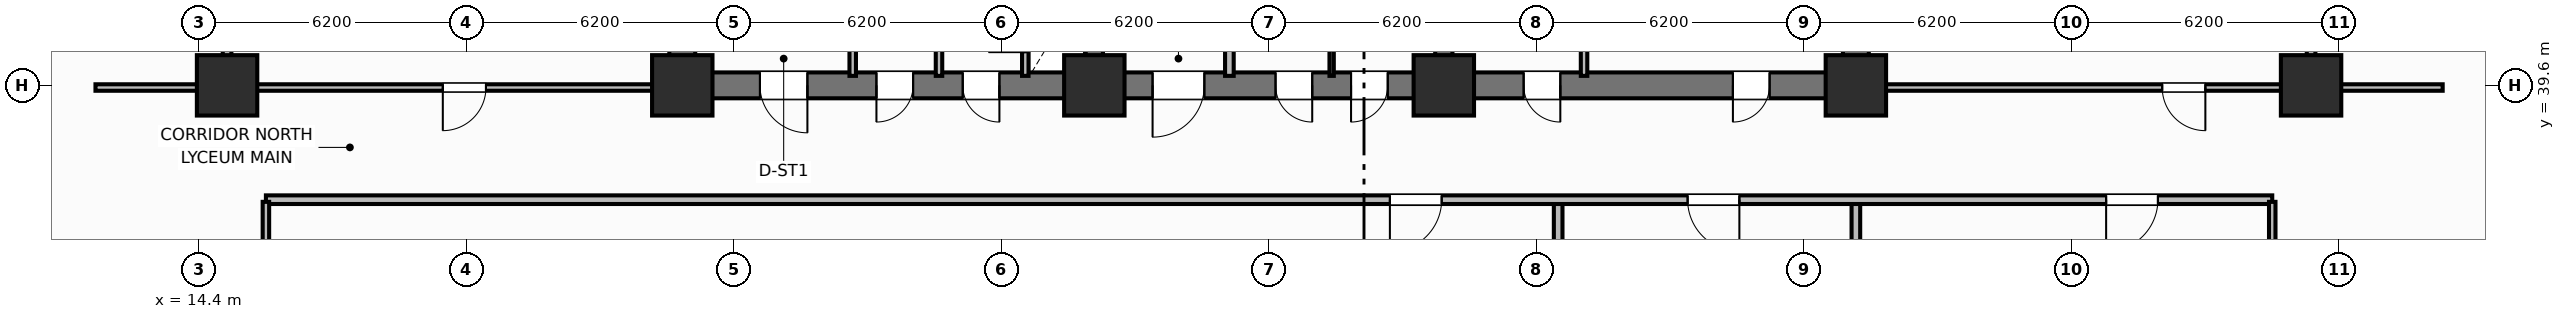
"""IFC4 building model, lengths in metres.
Left out: names, types, materials, properties, quantities, classifications, styles, units other than length and angle.
Written with IfcOpenShell. Run it as: python <this file> out.ifc"""

import sys

from ifc_helpers import new_model, si_unit, direction, frame, frame_2d, origin, origin_2d, place, context, subcontext, project, spatial, rectangle, extrude, element, fill, save


model = new_model("IFC4")
c1 = context("Model", 3, precision=1e-05, world=origin(), true_north=direction((0.0, 1.0)))
c2 = subcontext(c1, "Body", "Model", "MODEL_VIEW")
j1 = project(units=[si_unit("LENGTHUNIT", "METRE"), si_unit("PLANEANGLEUNIT", "RADIAN")], contexts=[c1])
p1 = place(None, origin())
s1 = spatial("IfcSite", under=j1, at=p1, CompositionType="ELEMENT")
p2 = place(p1, origin())
s2 = spatial("IfcBuilding", under=s1, at=p2, CompositionType="ELEMENT")
p3 = place(p2, frame((0.0, 0.0, 15.6)))
s3 = spatial("IfcBuildingStorey", under=s2, at=p3, CompositionType="ELEMENT", Elevation=15.6)
for number, where, z_axis, x_axis in (
    (1, (25.6, 39.9, 0.0), (0.0, 0.0, 1.0), (0.0, 1.0, 0.0)),
    (2, (52.8, 39.9, 0.0), (0.0, 0.0, 1.0), (0.0, 1.0, 0.0)),
):
    element("IfcWall", number, at=place(p3, frame(where, z_axis=z_axis, x_axis=x_axis)), inside=s3, PredefinedType="SHEAR", context=c2, shape_type="SweptSolid", body=[
        extrude(rectangle(XDim=5.6, YDim=0.6, at=frame_2d((2.8, 0.0))), origin(), (0.0, 0.0, 1.0), 4.5),
    ])
p4 = place(p3, frame((52.8, 39.6, 0.0), z_axis=(0.0, 0.0, 1.0), x_axis=(-1.0, 0.0, 0.0)))
e3 = element("IfcWall", 3, at=p4, inside=s3, PredefinedType="SHEAR", context=c2, shape_type="SweptSolid", body=[
    extrude(rectangle(XDim=27.2, YDim=0.6, at=frame_2d((13.6, 0.0))), origin(), (0.0, 0.0, 1.0), 4.5),
])
p5 = place(p4, frame((24.3, 0.0, 0.0)))
e4 = element("IfcOpeningElement", 4, at=p5, cuts=e3, PredefinedType="OPENING", context=c2, shape_type="SweptSolid", body=[
    extrude(rectangle(XDim=1.1, YDim=2.15, at=frame_2d((0.55, 1.075))), frame((0.0, 0.31, 0.0), z_axis=(0.0, -1.0, 0.0), x_axis=(1.0, 0.0, 0.0)), (0.0, 0.0, 1.0), 0.62),
])
p6 = place(p4, frame((21.85, 0.0, 0.0)))
e5 = element("IfcOpeningElement", 5, at=p6, cuts=e3, PredefinedType="OPENING", context=c2, shape_type="SweptSolid", body=[
    extrude(rectangle(XDim=0.85, YDim=2.1, at=frame_2d((0.425, 1.05))), frame((0.0, 0.31, 0.0), z_axis=(0.0, -1.0, 0.0), x_axis=(1.0, 0.0, 0.0)), (0.0, 0.0, 1.0), 0.62),
])
p7 = place(p4, frame((19.85, 0.0, 0.0)))
e6 = element("IfcOpeningElement", 6, at=p7, cuts=e3, PredefinedType="OPENING", context=c2, shape_type="SweptSolid", body=[
    extrude(rectangle(XDim=0.85, YDim=2.1, at=frame_2d((0.425, 1.05))), frame((0.0, 0.31, 0.0), z_axis=(0.0, -1.0, 0.0), x_axis=(1.0, 0.0, 0.0)), (0.0, 0.0, 1.0), 0.62),
])
p8 = place(p4, frame((15.1, 0.0, 0.0)))
e7 = element("IfcOpeningElement", 7, at=p8, cuts=e3, PredefinedType="OPENING", context=c2, shape_type="SweptSolid", body=[
    extrude(rectangle(XDim=1.2, YDim=2.15, at=frame_2d((0.6, 1.075))), frame((0.0, 0.31, 0.0), z_axis=(0.0, -1.0, 0.0), x_axis=(1.0, 0.0, 0.0)), (0.0, 0.0, 1.0), 0.62),
])
p9 = place(p4, frame((12.6, 0.0, 0.0)))
e8 = element("IfcOpeningElement", 8, at=p9, cuts=e3, PredefinedType="OPENING", context=c2, shape_type="SweptSolid", body=[
    extrude(rectangle(XDim=0.85, YDim=2.1, at=frame_2d((0.425, 1.05))), frame((0.0, 0.31, 0.0), z_axis=(0.0, -1.0, 0.0), x_axis=(1.0, 0.0, 0.0)), (0.0, 0.0, 1.0), 0.62),
])
p10 = place(p4, frame((10.85, 0.0, 0.0)))
e9 = element("IfcOpeningElement", 9, at=p10, cuts=e3, PredefinedType="OPENING", context=c2, shape_type="SweptSolid", body=[
    extrude(rectangle(XDim=0.85, YDim=2.1, at=frame_2d((0.425, 1.05))), frame((0.0, 0.31, 0.0), z_axis=(0.0, -1.0, 0.0), x_axis=(1.0, 0.0, 0.0)), (0.0, 0.0, 1.0), 0.62),
])
p11 = place(p4, frame((6.85, 0.0, 0.0)))
e10 = element("IfcOpeningElement", 10, at=p11, cuts=e3, PredefinedType="OPENING", context=c2, shape_type="SweptSolid", body=[
    extrude(rectangle(XDim=0.85, YDim=2.1, at=frame_2d((0.425, 1.05))), frame((0.0, 0.31, 0.0), z_axis=(0.0, -1.0, 0.0), x_axis=(1.0, 0.0, 0.0)), (0.0, 0.0, 1.0), 0.62),
])
p12 = place(p4, frame((2.0, 0.0, 0.0)))
e11 = element("IfcOpeningElement", 11, at=p12, cuts=e3, PredefinedType="OPENING", context=c2, shape_type="SweptSolid", body=[
    extrude(rectangle(XDim=0.85, YDim=2.1, at=frame_2d((0.425, 1.05))), frame((0.0, 0.31, 0.0), z_axis=(0.0, -1.0, 0.0), x_axis=(1.0, 0.0, 0.0)), (0.0, 0.0, 1.0), 0.62),
])
for number, where, z_axis, x_axis in (
    (12, (35.15, 39.9, 0.0), (0.0, 0.0, 1.0), (0.0, 1.0, 0.0)),
    (13, (43.25, 39.9, 0.0), (0.0, 0.0, 1.0), (0.0, 1.0, 0.0)),
):
    element("IfcWall", number, at=place(p3, frame(where, z_axis=z_axis, x_axis=x_axis)), inside=s3, PredefinedType="SHEAR", context=c2, shape_type="SweptSolid", body=[
        extrude(rectangle(XDim=5.6, YDim=0.4, at=frame_2d((2.8, 0.0))), origin(), (0.0, 0.0, 1.0), 4.5),
    ])
for number, where, z_axis, x_axis in (
    (14, (25.6, 39.6, 0.0), (0.0, 0.0, 1.0), (1.0, 0.0, 0.0)),
    (15, (35.15, 39.6, 0.0), (0.0, 0.0, 1.0), (1.0, 0.0, 0.0)),
    (16, (43.25, 39.6, 0.0), (0.0, 0.0, 1.0), (1.0, 0.0, 0.0)),
    (17, (52.8, 39.6, 0.0), (0.0, 0.0, 1.0), (1.0, 0.0, 0.0)),
    (18, (15.05, 39.6, 0.0), (0.0, 0.0, 1.0), (1.0, 0.0, 0.0)),
    (19, (63.35, 39.6, 0.0), (0.0, 0.0, 1.0), (1.0, 0.0, 0.0)),
):
    element("IfcColumn", number, at=place(p3, frame(where, z_axis=z_axis, x_axis=x_axis)), inside=s3, PredefinedType="COLUMN", context=c2, shape_type="SweptSolid", body=[
        extrude(rectangle(XDim=1.4, YDim=1.4, at=origin_2d()), origin(), (0.0, 0.0, 1.0), 4.5),
    ])
p13 = place(p3, frame((33.55, 39.82, 0.0), z_axis=(0.0, 0.0, 1.0), x_axis=(0.0, 1.0, 0.0)))
e20 = element("IfcWall", 20, at=p13, inside=s3, PredefinedType="PARTITIONING", context=c2, shape_type="SweptSolid", body=[
    extrude(rectangle(XDim=2.13, YDim=0.15, at=frame_2d((1.065, 0.0))), origin(), (0.0, 0.0, 1.0), 3.42),
])
p14 = place(p13, frame((0.55, 0.0, 0.0)))
e21 = element("IfcOpeningElement", 21, at=p14, cuts=e20, PredefinedType="OPENING", context=c2, shape_type="SweptSolid", body=[
    extrude(rectangle(XDim=0.85, YDim=2.05, at=frame_2d((0.425, 1.025))), frame((0.0, 0.085, 0.0), z_axis=(0.0, -1.0, 0.0), x_axis=(1.0, 0.0, 0.0)), (0.0, 0.0, 1.0), 0.17),
])
for number, where, z_axis, x_axis in (
    (22, (29.55, 39.82, 0.0), (0.0, 0.0, 1.0), (0.0, 1.0, 0.0)),
    (23, (31.55, 39.82, 0.0), (0.0, 0.0, 1.0), (0.0, 1.0, 0.0)),
):
    element("IfcWall", number, at=place(p3, frame(where, z_axis=z_axis, x_axis=x_axis)), inside=s3, PredefinedType="PARTITIONING", context=c2, shape_type="SweptSolid", body=[
        extrude(rectangle(XDim=2.13, YDim=0.15, at=frame_2d((1.065, 0.0))), origin(), (0.0, 0.0, 1.0), 3.42),
    ])
p15 = place(p3, frame((38.28, 39.82, 0.0), z_axis=(0.0, 0.0, 1.0), x_axis=(0.0, 1.0, 0.0)))
e24 = element("IfcWall", 24, at=p15, inside=s3, PredefinedType="PARTITIONING", context=c2, shape_type="SweptSolid", body=[
    extrude(rectangle(XDim=2.73, YDim=0.2, at=frame_2d((1.365, 0.0))), origin(), (0.0, 0.0, 1.0), 3.42),
])
p16 = place(p3, frame((40.65, 39.82, 0.0), z_axis=(0.0, 0.0, 1.0), x_axis=(0.0, 1.0, 0.0)))
e25 = element("IfcWall", 25, at=p16, inside=s3, PredefinedType="PARTITIONING", context=c2, shape_type="SweptSolid", body=[
    extrude(rectangle(XDim=2.73, YDim=0.1, at=frame_2d((1.365, 0.0))), origin(), (0.0, 0.0, 1.0), 3.42),
])
p17 = place(p3, frame((46.5, 39.82, 0.0), z_axis=(0.0, 0.0, 1.0), x_axis=(0.0, 1.0, 0.0)))
e26 = element("IfcWall", 26, at=p17, inside=s3, PredefinedType="PARTITIONING", context=c2, shape_type="SweptSolid", body=[
    extrude(rectangle(XDim=2.73, YDim=0.15, at=frame_2d((1.365, 0.0))), origin(), (0.0, 0.0, 1.0), 3.42),
])
for number, where, z_axis, x_axis in (
    (27, (45.9, 19.5, 0.0), (0.0, 0.0, 1.0), (0.0, 1.0, 0.0)),
    (28, (52.8, 19.5, 0.0), (0.0, 0.0, 1.0), (0.0, 1.0, 0.0)),
):
    element("IfcWall", number, at=place(p3, frame(where, z_axis=z_axis, x_axis=x_axis)), inside=s3, PredefinedType="PARTITIONING", context=c2, shape_type="SweptSolid", body=[
        extrude(rectangle(XDim=17.4, YDim=0.2, at=frame_2d((8.7, 0.0))), origin(), (0.0, 0.0, 1.0), 3.42),
    ])
p18 = place(p3, frame((62.45, 36.95, 0.0), z_axis=(0.0, 0.0, 1.0), x_axis=(-1.0, 0.0, 0.0)))
e29 = element("IfcWall", 29, at=p18, inside=s3, PredefinedType="PARTITIONING", context=c2, shape_type="SweptSolid", body=[
    extrude(rectangle(XDim=46.5, YDim=0.2, at=frame_2d((23.25, 0.0))), origin(), (0.0, 0.0, 1.0), 3.42),
])
p19 = place(p18, frame((19.25, 0.0, 0.0)))
e30 = element("IfcOpeningElement", 30, at=p19, cuts=e29, PredefinedType="OPENING", context=c2, shape_type="SweptSolid", body=[
    extrude(rectangle(XDim=1.2, YDim=2.15, at=frame_2d((0.6, 1.075))), frame((0.0, 0.11, 0.0), z_axis=(0.0, -1.0, 0.0), x_axis=(1.0, 0.0, 0.0)), (0.0, 0.0, 1.0), 0.22),
])
p20 = place(p18, frame((12.35, 0.0, 0.0)))
e31 = element("IfcOpeningElement", 31, at=p20, cuts=e29, PredefinedType="OPENING", context=c2, shape_type="SweptSolid", body=[
    extrude(rectangle(XDim=1.2, YDim=2.15, at=frame_2d((0.6, 1.075))), frame((0.0, 0.11, 0.0), z_axis=(0.0, -1.0, 0.0), x_axis=(1.0, 0.0, 0.0)), (0.0, 0.0, 1.0), 0.22),
])
p21 = place(p18, frame((2.65, 0.0, 0.0)))
e32 = element("IfcOpeningElement", 32, at=p21, cuts=e29, PredefinedType="OPENING", context=c2, shape_type="SweptSolid", body=[
    extrude(rectangle(XDim=1.2, YDim=2.15, at=frame_2d((0.6, 1.075))), frame((0.0, 0.11, 0.0), z_axis=(0.0, -1.0, 0.0), x_axis=(1.0, 0.0, 0.0)), (0.0, 0.0, 1.0), 0.22),
])
for number, where, z_axis, x_axis in (
    (33, (15.95, 19.5, 0.0), (0.0, 0.0, 1.0), (0.0, 1.0, 0.0)),
    (34, (62.45, 19.5, 0.0), (0.0, 0.0, 1.0), (0.0, 1.0, 0.0)),
):
    element("IfcWall", number, at=place(p3, frame(where, z_axis=z_axis, x_axis=x_axis)), inside=s3, PredefinedType="PARTITIONING", context=c2, shape_type="SweptSolid", body=[
        extrude(rectangle(XDim=17.4, YDim=0.15, at=frame_2d((8.7, 0.0))), origin(), (0.0, 0.0, 1.0), 3.42),
    ])
p22 = place(p3, frame((15.05, 39.6, 0.0), z_axis=(0.0, 0.0, 1.0), x_axis=(0.0, 1.0, 0.0)))
e35 = element("IfcWall", 35, at=p22, inside=s3, PredefinedType="PARTITIONING", context=c2, shape_type="SweptSolid", body=[
    extrude(rectangle(XDim=16.4, YDim=0.2, at=frame_2d((8.2, 0.0))), origin(), (0.0, 0.0, 1.0), 3.42),
])
p23 = place(p22, frame((3.4, 0.0, 0.0)))
e36 = element("IfcOpeningElement", 36, at=p23, cuts=e35, PredefinedType="OPENING", context=c2, shape_type="SweptSolid", body=[
    extrude(rectangle(XDim=1.0, YDim=2.15, at=frame_2d((0.5, 1.075))), frame((0.0, 0.11, 0.0), z_axis=(0.0, -1.0, 0.0), x_axis=(1.0, 0.0, 0.0)), (0.0, 0.0, 1.0), 0.22),
])
p24 = place(p3, frame((25.25, 39.55, 0.0), z_axis=(0.0, 0.0, 1.0), x_axis=(-1.0, 0.0, 0.0)))
e37 = element("IfcWall", 37, at=p24, inside=s3, PredefinedType="PARTITIONING", context=c2, shape_type="SweptSolid", body=[
    extrude(rectangle(XDim=13.25, YDim=0.15, at=frame_2d((6.625, 0.0))), origin(), (0.0, 0.0, 1.0), 3.42),
])
p25 = place(p24, frame((4.2, 0.0, 0.0)))
e38 = element("IfcOpeningElement", 38, at=p25, cuts=e37, PredefinedType="OPENING", context=c2, shape_type="SweptSolid", body=[
    extrude(rectangle(XDim=1.0, YDim=2.15, at=frame_2d((0.5, 1.075))), frame((0.0, 0.085, 0.0), z_axis=(0.0, -1.0, 0.0), x_axis=(1.0, 0.0, 0.0)), (0.0, 0.0, 1.0), 0.17),
])
p26 = place(p3, frame((63.35, 39.6, 0.0), z_axis=(0.0, 0.0, 1.0), x_axis=(0.0, 1.0, 0.0)))
e39 = element("IfcWall", 39, at=p26, inside=s3, PredefinedType="PARTITIONING", context=c2, shape_type="SweptSolid", body=[
    extrude(rectangle(XDim=16.4, YDim=0.2, at=frame_2d((8.2, 0.0))), origin(), (0.0, 0.0, 1.0), 3.42),
])
p27 = place(p26, frame((3.4, 0.0, 0.0)))
e40 = element("IfcOpeningElement", 40, at=p27, cuts=e39, PredefinedType="OPENING", context=c2, shape_type="SweptSolid", body=[
    extrude(rectangle(XDim=1.0, YDim=2.15, at=frame_2d((0.5, 1.075))), frame((0.0, 0.11, 0.0), z_axis=(0.0, -1.0, 0.0), x_axis=(1.0, 0.0, 0.0)), (0.0, 0.0, 1.0), 0.22),
])
p28 = place(p3, frame((66.4, 39.55, 0.0), z_axis=(0.0, 0.0, 1.0), x_axis=(-1.0, 0.0, 0.0)))
e41 = element("IfcWall", 41, at=p28, inside=s3, PredefinedType="PARTITIONING", context=c2, shape_type="SweptSolid", body=[
    extrude(rectangle(XDim=13.25, YDim=0.15, at=frame_2d((6.625, 0.0))), origin(), (0.0, 0.0, 1.0), 3.42),
])
p29 = place(p28, frame((5.5, 0.0, 0.0)))
e42 = element("IfcOpeningElement", 42, at=p29, cuts=e41, PredefinedType="OPENING", context=c2, shape_type="SweptSolid", body=[
    extrude(rectangle(XDim=1.0, YDim=2.15, at=frame_2d((0.5, 1.075))), frame((0.0, 0.085, 0.0), z_axis=(0.0, -1.0, 0.0), x_axis=(1.0, 0.0, 0.0)), (0.0, 0.0, 1.0), 0.17),
])
p30 = place(p14, origin())
e43 = element("IfcDoor", 43, at=p30, inside=s3, OperationType="SINGLE_SWING_LEFT", PredefinedType="TRAPDOOR", context=c2, shape_type="SweptSolid", body=[
    extrude(rectangle(XDim=0.85, YDim=2.05, at=frame_2d((0.425, 1.025))), frame((0.0, 0.025, 0.0), z_axis=(0.0, -1.0, 0.0), x_axis=(1.0, 0.0, 0.0)), (0.0, 0.0, 1.0), 0.05),
])
fill(e21, e43)
p31 = place(p19, origin())
e44 = element("IfcDoor", 44, at=p31, inside=s3, OperationType="SINGLE_SWING_RIGHT", PredefinedType="DOOR", context=c2, shape_type="SweptSolid", body=[
    extrude(rectangle(XDim=1.2, YDim=2.15, at=frame_2d((0.6, 1.075))), frame((0.0, 0.025, 0.0), z_axis=(0.0, -1.0, 0.0), x_axis=(1.0, 0.0, 0.0)), (0.0, 0.0, 1.0), 0.05),
])
fill(e30, e44)
p32 = place(p20, origin())
e45 = element("IfcDoor", 45, at=p32, inside=s3, OperationType="SINGLE_SWING_LEFT", PredefinedType="DOOR", context=c2, shape_type="SweptSolid", body=[
    extrude(rectangle(XDim=1.2, YDim=2.15, at=frame_2d((0.6, 1.075))), frame((0.0, 0.025, 0.0), z_axis=(0.0, -1.0, 0.0), x_axis=(1.0, 0.0, 0.0)), (0.0, 0.0, 1.0), 0.05),
])
fill(e31, e45)
p33 = place(p21, origin())
e46 = element("IfcDoor", 46, at=p33, inside=s3, OperationType="SINGLE_SWING_RIGHT", PredefinedType="DOOR", context=c2, shape_type="SweptSolid", body=[
    extrude(rectangle(XDim=1.2, YDim=2.15, at=frame_2d((0.6, 1.075))), frame((0.0, 0.025, 0.0), z_axis=(0.0, -1.0, 0.0), x_axis=(1.0, 0.0, 0.0)), (0.0, 0.0, 1.0), 0.05),
])
fill(e32, e46)
p34 = place(p25, origin())
e47 = element("IfcDoor", 47, at=p34, inside=s3, OperationType="SINGLE_SWING_RIGHT", PredefinedType="DOOR", context=c2, shape_type="SweptSolid", body=[
    extrude(rectangle(XDim=1.0, YDim=2.15, at=frame_2d((0.5, 1.075))), frame((0.0, 0.025, 0.0), z_axis=(0.0, -1.0, 0.0), x_axis=(1.0, 0.0, 0.0)), (0.0, 0.0, 1.0), 0.05),
])
fill(e38, e47)
p35 = place(p29, origin())
e48 = element("IfcDoor", 48, at=p35, inside=s3, OperationType="SINGLE_SWING_LEFT", PredefinedType="DOOR", context=c2, shape_type="SweptSolid", body=[
    extrude(rectangle(XDim=1.0, YDim=2.15, at=frame_2d((0.5, 1.075))), frame((0.0, 0.025, 0.0), z_axis=(0.0, -1.0, 0.0), x_axis=(1.0, 0.0, 0.0)), (0.0, 0.0, 1.0), 0.05),
])
fill(e42, e48)
p36 = place(p5, origin())
e49 = element("IfcDoor", 49, at=p36, inside=s3, OperationType="SINGLE_SWING_LEFT", PredefinedType="DOOR", context=c2, shape_type="SweptSolid", body=[
    extrude(rectangle(XDim=1.1, YDim=2.15, at=frame_2d((0.55, 1.075))), frame((0.0, 0.025, 0.0), z_axis=(0.0, -1.0, 0.0), x_axis=(1.0, 0.0, 0.0)), (0.0, 0.0, 1.0), 0.05),
])
fill(e4, e49)
p37 = place(p6, origin())
e50 = element("IfcDoor", 50, at=p37, inside=s3, OperationType="SINGLE_SWING_RIGHT", PredefinedType="DOOR", context=c2, shape_type="SweptSolid", body=[
    extrude(rectangle(XDim=0.85, YDim=2.1, at=frame_2d((0.425, 1.05))), frame((0.0, 0.025, 0.0), z_axis=(0.0, -1.0, 0.0), x_axis=(1.0, 0.0, 0.0)), (0.0, 0.0, 1.0), 0.05),
])
fill(e5, e50)
p38 = place(p7, origin())
e51 = element("IfcDoor", 51, at=p38, inside=s3, OperationType="SINGLE_SWING_LEFT", PredefinedType="DOOR", context=c2, shape_type="SweptSolid", body=[
    extrude(rectangle(XDim=0.85, YDim=2.1, at=frame_2d((0.425, 1.05))), frame((0.0, 0.025, 0.0), z_axis=(0.0, -1.0, 0.0), x_axis=(1.0, 0.0, 0.0)), (0.0, 0.0, 1.0), 0.05),
])
fill(e6, e51)
p39 = place(p8, origin())
e52 = element("IfcDoor", 52, at=p39, inside=s3, OperationType="SINGLE_SWING_RIGHT", PredefinedType="DOOR", context=c2, shape_type="SweptSolid", body=[
    extrude(rectangle(XDim=1.2, YDim=2.15, at=frame_2d((0.6, 1.075))), frame((0.0, 0.025, 0.0), z_axis=(0.0, -1.0, 0.0), x_axis=(1.0, 0.0, 0.0)), (0.0, 0.0, 1.0), 0.05),
])
fill(e7, e52)
p40 = place(p9, origin())
e53 = element("IfcDoor", 53, at=p40, inside=s3, OperationType="SINGLE_SWING_LEFT", PredefinedType="DOOR", context=c2, shape_type="SweptSolid", body=[
    extrude(rectangle(XDim=0.85, YDim=2.1, at=frame_2d((0.425, 1.05))), frame((0.0, 0.025, 0.0), z_axis=(0.0, -1.0, 0.0), x_axis=(1.0, 0.0, 0.0)), (0.0, 0.0, 1.0), 0.05),
])
fill(e8, e53)
p41 = place(p10, origin())
e54 = element("IfcDoor", 54, at=p41, inside=s3, OperationType="SINGLE_SWING_RIGHT", PredefinedType="DOOR", context=c2, shape_type="SweptSolid", body=[
    extrude(rectangle(XDim=0.85, YDim=2.1, at=frame_2d((0.425, 1.05))), frame((0.0, 0.025, 0.0), z_axis=(0.0, -1.0, 0.0), x_axis=(1.0, 0.0, 0.0)), (0.0, 0.0, 1.0), 0.05),
])
fill(e9, e54)
p42 = place(p11, origin())
e55 = element("IfcDoor", 55, at=p42, inside=s3, OperationType="SINGLE_SWING_LEFT", PredefinedType="DOOR", context=c2, shape_type="SweptSolid", body=[
    extrude(rectangle(XDim=0.85, YDim=2.1, at=frame_2d((0.425, 1.05))), frame((0.0, 0.025, 0.0), z_axis=(0.0, -1.0, 0.0), x_axis=(1.0, 0.0, 0.0)), (0.0, 0.0, 1.0), 0.05),
])
fill(e10, e55)
p43 = place(p12, origin())
e56 = element("IfcDoor", 56, at=p43, inside=s3, OperationType="SINGLE_SWING_RIGHT", PredefinedType="DOOR", context=c2, shape_type="SweptSolid", body=[
    extrude(rectangle(XDim=0.85, YDim=2.1, at=frame_2d((0.425, 1.05))), frame((0.0, 0.025, 0.0), z_axis=(0.0, -1.0, 0.0), x_axis=(1.0, 0.0, 0.0)), (0.0, 0.0, 1.0), 0.05),
])
fill(e11, e56)
save(model, sys.argv[1])
